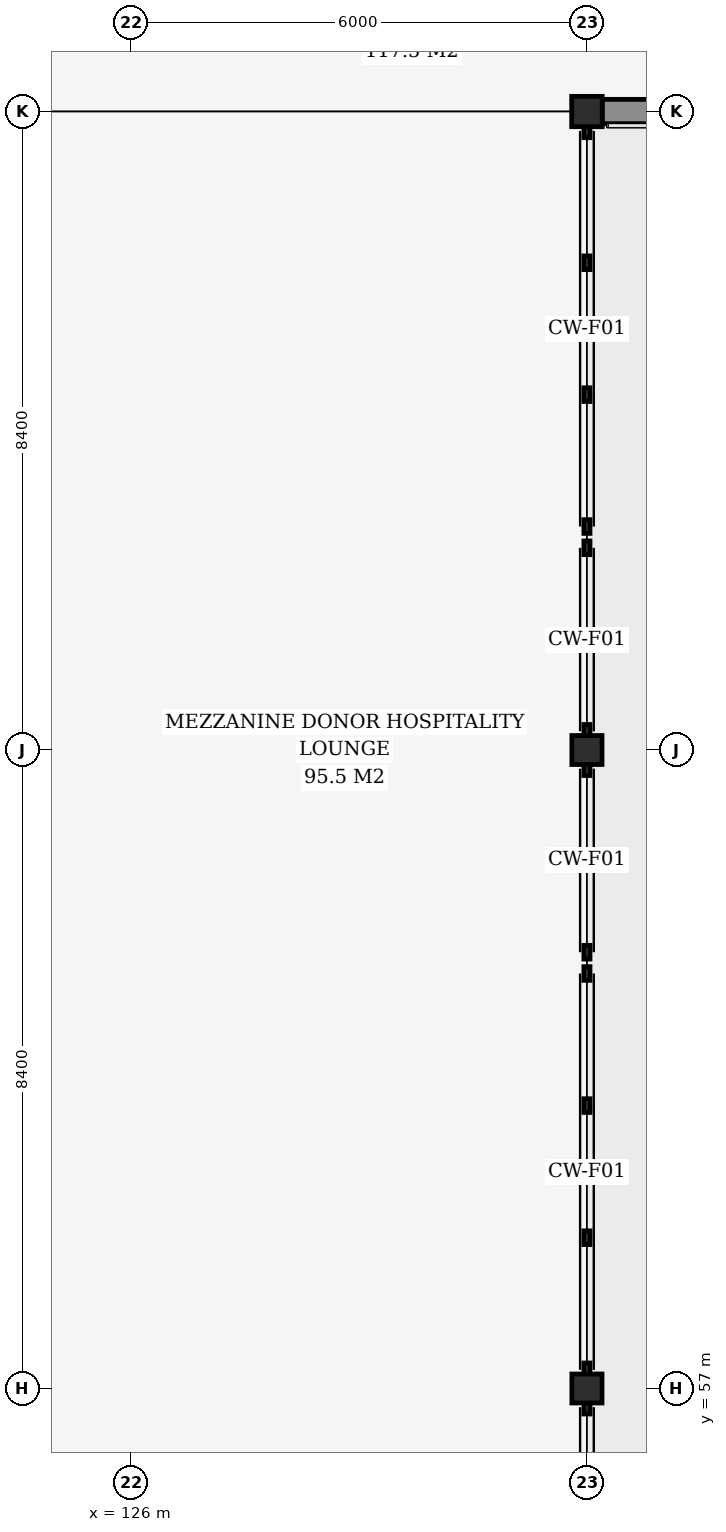
"""IFC4 building model, lengths in metres.
Left out: names, types, materials, properties, quantities, classifications, styles, units other than length and angle.
Written with IfcOpenShell. Run it as: python <this file> out.ifc"""

import sys

from ifc_helpers import new_model, si_unit, direction, frame, frame_2d, origin, origin_2d, place, context, subcontext, project, spatial, rectangle, i_section, extrude, element, save


model = new_model("IFC4")
c1 = context("Model", 3, precision=1e-05, world=origin(), true_north=direction((0.0, 1.0)))
c2 = subcontext(c1, "Body", "Model", "MODEL_VIEW")
j1 = project(units=[si_unit("LENGTHUNIT", "METRE"), si_unit("PLANEANGLEUNIT", "RADIAN")], contexts=[c1])
p1 = place(None, origin())
s1 = spatial("IfcSite", under=j1, at=p1, CompositionType="ELEMENT")
p2 = place(p1, origin())
s2 = spatial("IfcBuilding", under=s1, at=p2, CompositionType="ELEMENT")
p3 = place(p2, frame((0.0, 0.0, 4.8)))
s3 = spatial("IfcBuildingStorey", under=s2, at=p3, CompositionType="ELEMENT", Elevation=4.8)
p4 = place(p3, frame((132.0, 73.8, 0.0), z_axis=(0.0, 0.0, 1.0), x_axis=(1.0, 0.0, 0.0)))
e1 = element("IfcColumn", 1, at=p4, inside=s3, PredefinedType="COLUMN", context=c2, shape_type="SweptSolid", body=[
    extrude(i_section(OverallWidth=0.401, OverallDepth=0.399, WebThickness=0.025, FlangeThickness=0.04, at=origin_2d()), origin(), (0.0, 0.0, 1.0), 4.5),
])
for number, where, z_axis, x_axis in (
    (2, (132.0, 57.0, 0.0), (0.0, 0.0, 1.0), (1.0, 0.0, 0.0)),
    (3, (132.0, 65.4, 0.0), (0.0, 0.0, 1.0), (1.0, 0.0, 0.0)),
):
    element("IfcColumn", number, at=place(p3, frame(where, z_axis=z_axis, x_axis=x_axis)), inside=s3, PredefinedType="COLUMN", context=c2, shape_type="SweptSolid", body=[
        extrude(i_section(OverallWidth=0.396, OverallDepth=0.381, WebThickness=0.019, FlangeThickness=0.03, at=origin_2d()), origin(), (0.0, 0.0, 1.0), 4.26),
    ])
p5 = place(p3, frame((143.575, 73.8, 0.0), z_axis=(0.0, 0.0, 1.0), x_axis=(-1.0, 0.0, 0.0)))
e4 = element("IfcWall", 4, at=p5, inside=s3, PredefinedType="SOLIDWALL", context=c2, shape_type="SweptSolid", body=[
    extrude(rectangle(XDim=11.375, YDim=0.32, at=frame_2d((5.687, 0.0))), origin(), (0.0, 0.0, 1.0), 3.684),
])
p6 = place(p5, frame((1.885, 0.0, 0.85)))
e5 = element("IfcOpeningElement", 5, at=p6, cuts=e4, PredefinedType="OPENING", context=c2, shape_type="SweptSolid", body=[
    extrude(rectangle(XDim=2.6, YDim=1.7, at=frame_2d((1.3, 0.85))), frame((0.0, 0.17, 0.0), z_axis=(0.0, -1.0, 0.0), x_axis=(1.0, 0.0, 0.0)), (0.0, 0.0, 1.0), 0.34),
])
save(model, sys.argv[1])
